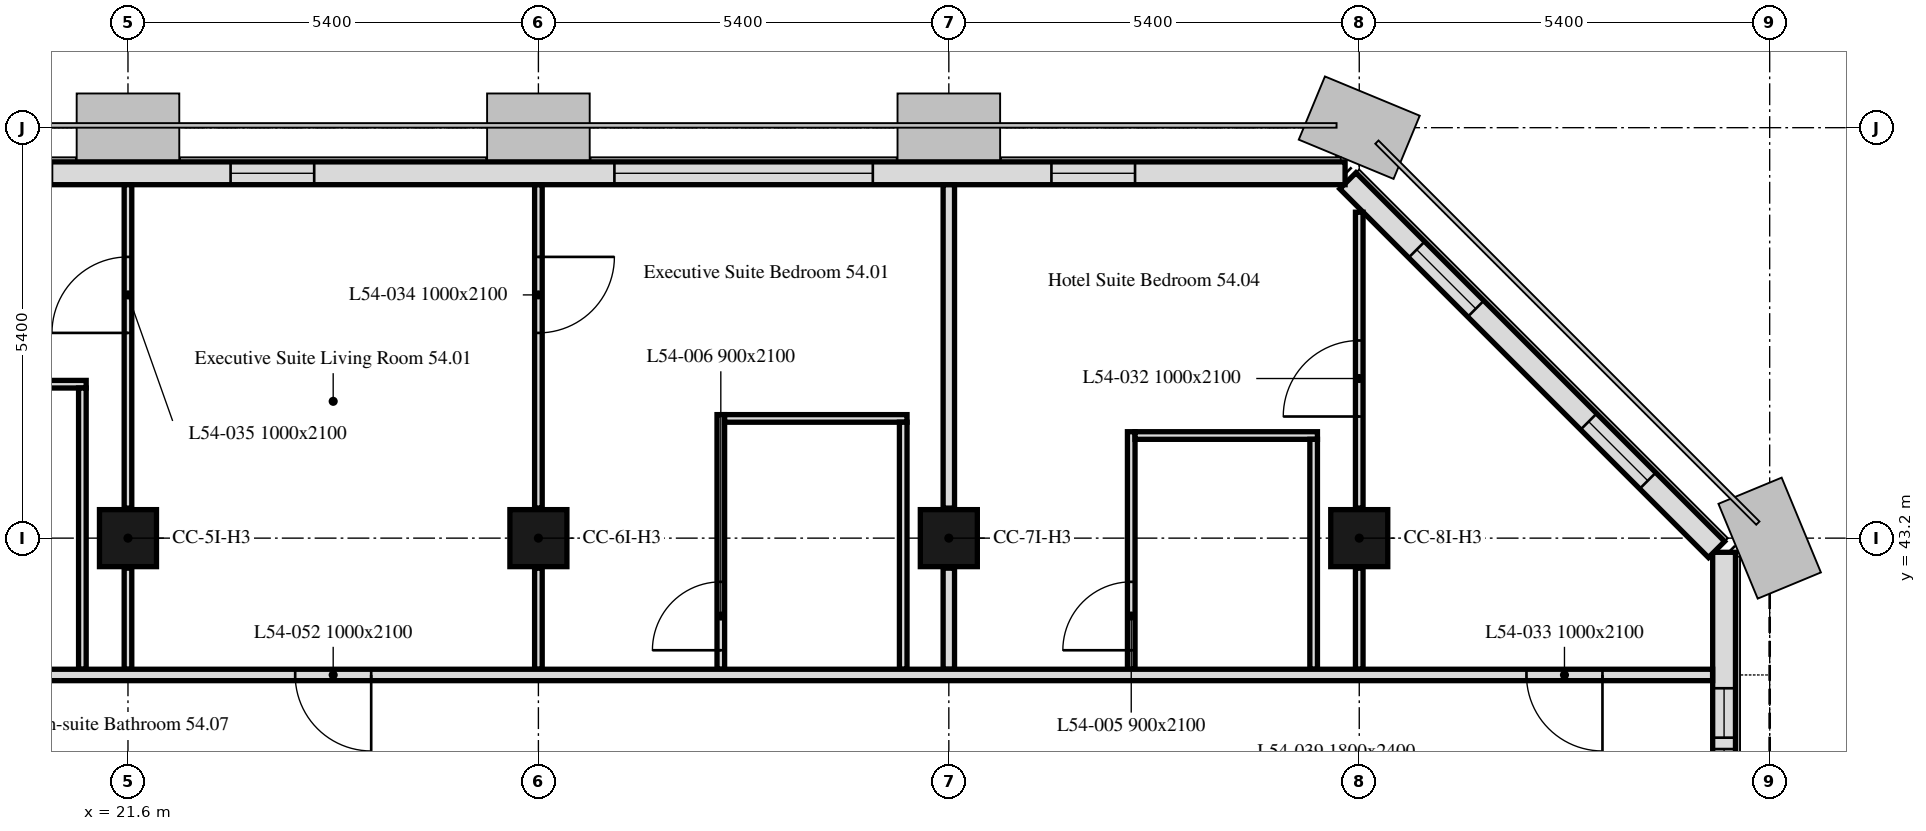
"""IFC4 building model, lengths in metres.
Left out: names, types, materials, properties, quantities, classifications, styles, units other than length and angle.
Written with IfcOpenShell. Run it as: python <this file> out.ifc"""

import sys

from ifc_helpers import new_model, si_unit, direction, frame, frame_2d, origin, origin_2d, place, context, subcontext, project, spatial, rectangle, extrude, element, fill, save


model = new_model("IFC4")
c1 = context("Model", 3, precision=1e-05, world=origin(), true_north=direction((0.0, 1.0)))
c2 = subcontext(c1, "Body", "Model", "MODEL_VIEW")
j1 = project(units=[si_unit("LENGTHUNIT", "METRE"), si_unit("PLANEANGLEUNIT", "RADIAN")], contexts=[c1])
p1 = place(None, origin())
s1 = spatial("IfcSite", under=j1, at=p1, CompositionType="ELEMENT")
p2 = place(p1, origin())
s2 = spatial("IfcBuilding", under=s1, at=p2, CompositionType="ELEMENT")
p3 = place(p2, frame((0.0, 0.0, 217.0)))
s3 = spatial("IfcBuildingStorey", under=s2, at=p3, CompositionType="ELEMENT", Elevation=217.0)
for number, where, z_axis, x_axis in (
    (1, (21.6, 43.2, 0.0), (0.0, 0.0, 1.0), (1.0, 0.0, 0.0)),
    (2, (27.0, 43.2, 0.0), (0.0, 0.0, 1.0), (1.0, 0.0, 0.0)),
    (3, (32.4, 43.2, 0.0), (0.0, 0.0, 1.0), (1.0, 0.0, 0.0)),
    (4, (37.8, 43.2, 0.0), (0.0, 0.0, 1.0), (1.0, 0.0, 0.0)),
):
    element("IfcColumn", number, at=place(p3, frame(where, z_axis=z_axis, x_axis=x_axis)), inside=s3, PredefinedType="COLUMN", context=c2, shape_type="SweptSolid", body=[
        extrude(rectangle(XDim=0.75, YDim=0.75, at=origin_2d()), origin(), (0.0, 0.0, 1.0), 3.0),
    ])
p4 = place(p3, frame((42.6, 32.4, 0.0), z_axis=(0.0, 0.0, 1.0), x_axis=(0.0, 1.0, 0.0)))
e5 = element("IfcWall", 5, at=p4, inside=s3, PredefinedType="SOLIDWALL", context=c2, shape_type="SweptSolid", body=[
    extrude(rectangle(XDim=10.614, YDim=0.3, at=frame_2d((5.307, 0.0))), origin(), (0.0, 0.0, 1.0), 3.0),
])
p5 = place(p4, frame((1.35, 0.0, 0.9)))
e6 = element("IfcOpeningElement", 6, at=p5, cuts=e5, PredefinedType="OPENING", context=c2, shape_type="SweptSolid", body=[
    extrude(rectangle(XDim=1.1, YDim=1.7, at=frame_2d((0.55, 0.85))), frame((0.0, 0.16, 0.0), z_axis=(0.0, -1.0, 0.0), x_axis=(1.0, 0.0, 0.0)), (0.0, 0.0, 1.0), 0.32),
])
p6 = place(p4, frame((2.95, 0.0, 0.9)))
e7 = element("IfcOpeningElement", 7, at=p6, cuts=e5, PredefinedType="OPENING", context=c2, shape_type="SweptSolid", body=[
    extrude(rectangle(XDim=1.1, YDim=1.7, at=frame_2d((0.55, 0.85))), frame((0.0, 0.16, 0.0), z_axis=(0.0, -1.0, 0.0), x_axis=(1.0, 0.0, 0.0)), (0.0, 0.0, 1.0), 0.32),
])
p7 = place(p4, frame((7.375, 0.0, 0.9)))
e8 = element("IfcOpeningElement", 8, at=p7, cuts=e5, PredefinedType="OPENING", context=c2, shape_type="SweptSolid", body=[
    extrude(rectangle(XDim=0.65, YDim=1.7, at=frame_2d((0.325, 0.85))), frame((0.0, 0.16, 0.0), z_axis=(0.0, -1.0, 0.0), x_axis=(1.0, 0.0, 0.0)), (0.0, 0.0, 1.0), 0.32),
])
p8 = place(p4, frame((8.175, 0.0, 0.9)))
e9 = element("IfcOpeningElement", 9, at=p8, cuts=e5, PredefinedType="OPENING", context=c2, shape_type="SweptSolid", body=[
    extrude(rectangle(XDim=0.65, YDim=1.7, at=frame_2d((0.325, 0.85))), frame((0.0, 0.16, 0.0), z_axis=(0.0, -1.0, 0.0), x_axis=(1.0, 0.0, 0.0)), (0.0, 0.0, 1.0), 0.32),
])
p9 = place(p3, frame((42.501, 43.051, 0.0), z_axis=(0.0, 0.0, 1.0), x_axis=(-0.707106781187, 0.707106781187, 0.0)))
e10 = element("IfcWall", 10, at=p9, inside=s3, PredefinedType="SOLIDWALL", context=c2, shape_type="SweptSolid", body=[
    extrude(rectangle(XDim=6.86, YDim=0.3, at=frame_2d((3.43, 0.0))), origin(), (0.0, 0.0, 1.0), 3.0),
])
p10 = place(p9, frame((1.28, 0.0, 0.9)))
e11 = element("IfcOpeningElement", 11, at=p10, cuts=e10, PredefinedType="OPENING", context=c2, shape_type="SweptSolid", body=[
    extrude(rectangle(XDim=1.1, YDim=1.7, at=frame_2d((0.55, 0.85))), frame((0.0, 0.16, 0.0), z_axis=(0.0, -1.0, 0.0), x_axis=(1.0, 0.0, 0.0)), (0.0, 0.0, 1.0), 0.32),
])
p11 = place(p9, frame((4.48, 0.0, 0.9)))
e12 = element("IfcOpeningElement", 12, at=p11, cuts=e10, PredefinedType="OPENING", context=c2, shape_type="SweptSolid", body=[
    extrude(rectangle(XDim=1.1, YDim=1.7, at=frame_2d((0.55, 0.85))), frame((0.0, 0.16, 0.0), z_axis=(0.0, -1.0, 0.0), x_axis=(1.0, 0.0, 0.0)), (0.0, 0.0, 1.0), 0.32),
])
p12 = place(p3, frame((37.614, 48.0, 0.0), z_axis=(0.0, 0.0, 1.0), x_axis=(-1.0, 0.0, 0.0)))
e13 = element("IfcWall", 13, at=p12, inside=s3, PredefinedType="SOLIDWALL", context=c2, shape_type="SweptSolid", body=[
    extrude(rectangle(XDim=32.027, YDim=0.3, at=frame_2d((16.014, 0.0))), origin(), (0.0, 0.0, 1.0), 3.0),
])
p13 = place(p12, frame((2.764, 0.0, 0.9)))
e14 = element("IfcOpeningElement", 14, at=p13, cuts=e13, PredefinedType="OPENING", context=c2, shape_type="SweptSolid", body=[
    extrude(rectangle(XDim=1.1, YDim=1.7, at=frame_2d((0.55, 0.85))), frame((0.0, 0.16, 0.0), z_axis=(0.0, -1.0, 0.0), x_axis=(1.0, 0.0, 0.0)), (0.0, 0.0, 1.0), 0.32),
])
p14 = place(p12, frame((6.214, 0.0, 0.9)))
e15 = element("IfcOpeningElement", 15, at=p14, cuts=e13, PredefinedType="OPENING", context=c2, shape_type="SweptSolid", body=[
    extrude(rectangle(XDim=3.4, YDim=1.7, at=frame_2d((1.7, 0.85))), frame((0.0, 0.16, 0.0), z_axis=(0.0, -1.0, 0.0), x_axis=(1.0, 0.0, 0.0)), (0.0, 0.0, 1.0), 0.32),
])
p15 = place(p12, frame((13.564, 0.0, 0.9)))
e16 = element("IfcOpeningElement", 16, at=p15, cuts=e13, PredefinedType="OPENING", context=c2, shape_type="SweptSolid", body=[
    extrude(rectangle(XDim=1.1, YDim=1.7, at=frame_2d((0.55, 0.85))), frame((0.0, 0.16, 0.0), z_axis=(0.0, -1.0, 0.0), x_axis=(1.0, 0.0, 0.0)), (0.0, 0.0, 1.0), 0.32),
])
p16 = place(p12, frame((17.014, 0.0, 0.9)))
e17 = element("IfcOpeningElement", 17, at=p16, cuts=e13, PredefinedType="OPENING", context=c2, shape_type="SweptSolid", body=[
    extrude(rectangle(XDim=3.4, YDim=1.7, at=frame_2d((1.7, 0.85))), frame((0.0, 0.16, 0.0), z_axis=(0.0, -1.0, 0.0), x_axis=(1.0, 0.0, 0.0)), (0.0, 0.0, 1.0), 0.32),
])
p17 = place(p12, frame((24.364, 0.0, 0.9)))
e18 = element("IfcOpeningElement", 18, at=p17, cuts=e13, PredefinedType="OPENING", context=c2, shape_type="SweptSolid", body=[
    extrude(rectangle(XDim=1.1, YDim=1.7, at=frame_2d((0.55, 0.85))), frame((0.0, 0.16, 0.0), z_axis=(0.0, -1.0, 0.0), x_axis=(1.0, 0.0, 0.0)), (0.0, 0.0, 1.0), 0.32),
])
p18 = place(p12, frame((27.814, 0.0, 0.9)))
e19 = element("IfcOpeningElement", 19, at=p18, cuts=e13, PredefinedType="OPENING", context=c2, shape_type="SweptSolid", body=[
    extrude(rectangle(XDim=3.4, YDim=1.7, at=frame_2d((1.7, 0.85))), frame((0.0, 0.16, 0.0), z_axis=(0.0, -1.0, 0.0), x_axis=(1.0, 0.0, 0.0)), (0.0, 0.0, 1.0), 0.32),
])
p19 = place(p3, frame((32.4, 47.849, 0.0), z_axis=(0.0, 0.0, 1.0), x_axis=(0.0, -1.0, 0.0)))
e20 = element("IfcWall", 20, at=p19, inside=s3, PredefinedType="PARTITIONING", context=c2, shape_type="SweptSolid", body=[
    extrude(rectangle(XDim=4.254, YDim=0.15, at=frame_2d((2.127, 0.0))), origin(), (0.0, 0.0, 1.0), 2.4),
])
p20 = place(p3, frame((32.4, 42.805, 0.0), z_axis=(0.0, 0.0, 1.0), x_axis=(0.0, -1.0, 0.0)))
e21 = element("IfcWall", 21, at=p20, inside=s3, PredefinedType="PARTITIONING", context=c2, shape_type="SweptSolid", body=[
    extrude(rectangle(XDim=1.33, YDim=0.15, at=frame_2d((0.665, 0.0))), origin(), (0.0, 0.0, 1.0), 2.4),
])
p21 = place(p3, frame((34.8, 41.475, 0.0), z_axis=(0.0, 0.0, 1.0), x_axis=(0.0, 1.0, 0.0)))
e22 = element("IfcWall", 22, at=p21, inside=s3, PredefinedType="PARTITIONING", context=c2, shape_type="SweptSolid", body=[
    extrude(rectangle(XDim=3.125, YDim=0.1, at=frame_2d((1.562, 0.0))), origin(), (0.0, 0.0, 1.0), 3.0),
])
p22 = place(p21, frame((0.25, 0.0, 0.0)))
e23 = element("IfcOpeningElement", 23, at=p22, cuts=e22, PredefinedType="OPENING", context=c2, shape_type="SweptSolid", body=[
    extrude(rectangle(XDim=0.9, YDim=2.1, at=frame_2d((0.45, 1.05))), frame((0.0, 0.05, 0.0), z_axis=(0.0, -1.0, 0.0), x_axis=(1.0, 0.0, 0.0)), (0.0, 0.0, 1.0), 0.1),
])
p23 = place(p3, frame((34.85, 44.55, 0.0), z_axis=(0.0, 0.0, 1.0), x_axis=(1.0, 0.0, 0.0)))
e24 = element("IfcWall", 24, at=p23, inside=s3, PredefinedType="PARTITIONING", context=c2, shape_type="SweptSolid", body=[
    extrude(rectangle(XDim=2.4, YDim=0.1, at=frame_2d((1.2, 0.0))), origin(), (0.0, 0.0, 1.0), 3.0),
])
p24 = place(p3, frame((37.2, 44.5, 0.0), z_axis=(0.0, 0.0, 1.0), x_axis=(0.0, -1.0, 0.0)))
e25 = element("IfcWall", 25, at=p24, inside=s3, PredefinedType="PARTITIONING", context=c2, shape_type="SweptSolid", body=[
    extrude(rectangle(XDim=3.025, YDim=0.1, at=frame_2d((1.512, 0.0))), origin(), (0.0, 0.0, 1.0), 3.0),
])
p25 = place(p3, frame((37.8, 41.475, 0.0), z_axis=(0.0, 0.0, 1.0), x_axis=(0.0, 1.0, 0.0)))
e26 = element("IfcWall", 26, at=p25, inside=s3, PredefinedType="PARTITIONING", context=c2, shape_type="SweptSolid", body=[
    extrude(rectangle(XDim=1.33, YDim=0.1, at=frame_2d((0.665, 0.0))), origin(), (0.0, 0.0, 1.0), 3.0),
])
p26 = place(p3, frame((37.8, 43.595, 0.0), z_axis=(0.0, 0.0, 1.0), x_axis=(0.0, 1.0, 0.0)))
e27 = element("IfcWall", 27, at=p26, inside=s3, PredefinedType="PARTITIONING", context=c2, shape_type="SweptSolid", body=[
    extrude(rectangle(XDim=3.893, YDim=0.1, at=frame_2d((1.946, 0.0))), origin(), (0.0, 0.0, 1.0), 3.0),
])
p27 = place(p26, frame((1.205, 0.0, 0.0)))
e28 = element("IfcOpeningElement", 28, at=p27, cuts=e27, PredefinedType="OPENING", context=c2, shape_type="SweptSolid", body=[
    extrude(rectangle(XDim=1.0, YDim=2.1, at=frame_2d((0.5, 1.05))), frame((0.0, 0.05, 0.0), z_axis=(0.0, -1.0, 0.0), x_axis=(1.0, 0.0, 0.0)), (0.0, 0.0, 1.0), 0.1),
])
p28 = place(p3, frame((27.0, 47.849, 0.0), z_axis=(0.0, 0.0, 1.0), x_axis=(0.0, -1.0, 0.0)))
e29 = element("IfcWall", 29, at=p28, inside=s3, PredefinedType="PARTITIONING", context=c2, shape_type="SweptSolid", body=[
    extrude(rectangle(XDim=4.254, YDim=0.1, at=frame_2d((2.127, 0.0))), origin(), (0.0, 0.0, 1.0), 2.4),
])
p29 = place(p28, frame((0.949, 0.0, 0.0)))
e30 = element("IfcOpeningElement", 30, at=p29, cuts=e29, PredefinedType="OPENING", context=c2, shape_type="SweptSolid", body=[
    extrude(rectangle(XDim=1.0, YDim=2.1, at=frame_2d((0.5, 1.05))), frame((0.0, 0.05, 0.0), z_axis=(0.0, -1.0, 0.0), x_axis=(1.0, 0.0, 0.0)), (0.0, 0.0, 1.0), 0.1),
])
p30 = place(p3, frame((27.0, 42.805, 0.0), z_axis=(0.0, 0.0, 1.0), x_axis=(0.0, -1.0, 0.0)))
e31 = element("IfcWall", 31, at=p30, inside=s3, PredefinedType="PARTITIONING", context=c2, shape_type="SweptSolid", body=[
    extrude(rectangle(XDim=1.33, YDim=0.1, at=frame_2d((0.665, 0.0))), origin(), (0.0, 0.0, 1.0), 2.4),
])
p31 = place(p3, frame((29.4, 41.475, 0.0), z_axis=(0.0, 0.0, 1.0), x_axis=(0.0, 1.0, 0.0)))
e32 = element("IfcWall", 32, at=p31, inside=s3, PredefinedType="PARTITIONING", context=c2, shape_type="SweptSolid", body=[
    extrude(rectangle(XDim=3.35, YDim=0.1, at=frame_2d((1.675, 0.0))), origin(), (0.0, 0.0, 1.0), 3.0),
])
p32 = place(p31, frame((0.25, 0.0, 0.0)))
e33 = element("IfcOpeningElement", 33, at=p32, cuts=e32, PredefinedType="OPENING", context=c2, shape_type="SweptSolid", body=[
    extrude(rectangle(XDim=0.9, YDim=2.1, at=frame_2d((0.45, 1.05))), frame((0.0, 0.05, 0.0), z_axis=(0.0, -1.0, 0.0), x_axis=(1.0, 0.0, 0.0)), (0.0, 0.0, 1.0), 0.1),
])
p33 = place(p3, frame((29.45, 44.775, 0.0), z_axis=(0.0, 0.0, 1.0), x_axis=(1.0, 0.0, 0.0)))
e34 = element("IfcWall", 34, at=p33, inside=s3, PredefinedType="PARTITIONING", context=c2, shape_type="SweptSolid", body=[
    extrude(rectangle(XDim=2.4, YDim=0.1, at=frame_2d((1.2, 0.0))), origin(), (0.0, 0.0, 1.0), 3.0),
])
p34 = place(p3, frame((31.8, 44.725, 0.0), z_axis=(0.0, 0.0, 1.0), x_axis=(0.0, -1.0, 0.0)))
e35 = element("IfcWall", 35, at=p34, inside=s3, PredefinedType="PARTITIONING", context=c2, shape_type="SweptSolid", body=[
    extrude(rectangle(XDim=3.25, YDim=0.1, at=frame_2d((1.625, 0.0))), origin(), (0.0, 0.0, 1.0), 3.0),
])
p35 = place(p3, frame((18.65, 45.225, 0.0), z_axis=(0.0, 0.0, 1.0), x_axis=(1.0, 0.0, 0.0)))
e36 = element("IfcWall", 36, at=p35, inside=s3, PredefinedType="PARTITIONING", context=c2, shape_type="SweptSolid", body=[
    extrude(rectangle(XDim=2.4, YDim=0.1, at=frame_2d((1.2, 0.0))), origin(), (0.0, 0.0, 1.0), 3.0),
])
p36 = place(p3, frame((21.0, 45.175, 0.0), z_axis=(0.0, 0.0, 1.0), x_axis=(0.0, -1.0, 0.0)))
e37 = element("IfcWall", 37, at=p36, inside=s3, PredefinedType="PARTITIONING", context=c2, shape_type="SweptSolid", body=[
    extrude(rectangle(XDim=3.7, YDim=0.1, at=frame_2d((1.85, 0.0))), origin(), (0.0, 0.0, 1.0), 3.0),
])
p37 = place(p3, frame((21.6, 41.475, 0.0), z_axis=(0.0, 0.0, 1.0), x_axis=(0.0, 1.0, 0.0)))
e38 = element("IfcWall", 38, at=p37, inside=s3, PredefinedType="PARTITIONING", context=c2, shape_type="SweptSolid", body=[
    extrude(rectangle(XDim=1.33, YDim=0.1, at=frame_2d((0.665, 0.0))), origin(), (0.0, 0.0, 1.0), 2.4),
])
p38 = place(p3, frame((21.6, 43.595, 0.0), z_axis=(0.0, 0.0, 1.0), x_axis=(0.0, 1.0, 0.0)))
e39 = element("IfcWall", 39, at=p38, inside=s3, PredefinedType="PARTITIONING", context=c2, shape_type="SweptSolid", body=[
    extrude(rectangle(XDim=4.254, YDim=0.1, at=frame_2d((2.127, 0.0))), origin(), (0.0, 0.0, 1.0), 2.4),
])
p39 = place(p38, frame((2.305, 0.0, 0.0)))
e40 = element("IfcOpeningElement", 40, at=p39, cuts=e39, PredefinedType="OPENING", context=c2, shape_type="SweptSolid", body=[
    extrude(rectangle(XDim=1.0, YDim=2.1, at=frame_2d((0.5, 1.05))), frame((0.0, 0.05, 0.0), z_axis=(0.0, -1.0, 0.0), x_axis=(1.0, 0.0, 0.0)), (0.0, 0.0, 1.0), 0.1),
])
p40 = place(p3, frame((42.449, 41.4, 0.0), z_axis=(0.0, 0.0, 1.0), x_axis=(-1.0, 0.0, 0.0)))
e41 = element("IfcWall", 41, at=p40, inside=s3, PredefinedType="PARTITIONING", context=c2, shape_type="SweptSolid", body=[
    extrude(rectangle(XDim=41.698, YDim=0.15, at=frame_2d((20.849, 0.0))), origin(), (0.0, 0.0, 1.0), 2.4),
])
p41 = place(p40, frame((1.449, 0.0, 0.0)))
e42 = element("IfcOpeningElement", 42, at=p41, cuts=e41, PredefinedType="OPENING", context=c2, shape_type="SweptSolid", body=[
    extrude(rectangle(XDim=1.0, YDim=2.1, at=frame_2d((0.5, 1.05))), frame((0.0, 0.075, 0.0), z_axis=(0.0, -1.0, 0.0), x_axis=(1.0, 0.0, 0.0)), (0.0, 0.0, 1.0), 0.15),
])
p42 = place(p40, frame((29.249, 0.0, 0.0)))
e43 = element("IfcOpeningElement", 43, at=p42, cuts=e41, PredefinedType="OPENING", context=c2, shape_type="SweptSolid", body=[
    extrude(rectangle(XDim=1.0, YDim=2.1, at=frame_2d((0.5, 1.05))), frame((0.0, 0.075, 0.0), z_axis=(0.0, -1.0, 0.0), x_axis=(1.0, 0.0, 0.0)), (0.0, 0.0, 1.0), 0.15),
])
p43 = place(p40, frame((37.599, 0.0, 0.0)))
e44 = element("IfcOpeningElement", 44, at=p43, cuts=e41, PredefinedType="OPENING", context=c2, shape_type="SweptSolid", body=[
    extrude(rectangle(XDim=1.0, YDim=2.1, at=frame_2d((0.5, 1.05))), frame((0.0, 0.075, 0.0), z_axis=(0.0, -1.0, 0.0), x_axis=(1.0, 0.0, 0.0)), (0.0, 0.0, 1.0), 0.15),
])
p44 = place(p40, frame((17.649, 0.0, 0.0)))
e45 = element("IfcOpeningElement", 45, at=p44, cuts=e41, PredefinedType="OPENING", context=c2, shape_type="SweptSolid", body=[
    extrude(rectangle(XDim=1.0, YDim=2.1, at=frame_2d((0.5, 1.05))), frame((0.0, 0.075, 0.0), z_axis=(0.0, -1.0, 0.0), x_axis=(1.0, 0.0, 0.0)), (0.0, 0.0, 1.0), 0.15),
])
p45 = place(p7, origin())
e46 = element("IfcWindow", 46, at=p45, inside=s3, PartitioningType="SINGLE_PANEL", PredefinedType="WINDOW", context=c2, shape_type="SweptSolid", body=[
    extrude(rectangle(XDim=0.65, YDim=1.7, at=frame_2d((0.325, 0.85))), frame((0.0, 0.03, 0.0), z_axis=(0.0, -1.0, 0.0), x_axis=(1.0, 0.0, 0.0)), (0.0, 0.0, 1.0), 0.06),
])
fill(e8, e46)
p46 = place(p8, origin())
e47 = element("IfcWindow", 47, at=p46, inside=s3, PartitioningType="SINGLE_PANEL", PredefinedType="WINDOW", context=c2, shape_type="SweptSolid", body=[
    extrude(rectangle(XDim=0.65, YDim=1.7, at=frame_2d((0.325, 0.85))), frame((0.0, 0.03, 0.0), z_axis=(0.0, -1.0, 0.0), x_axis=(1.0, 0.0, 0.0)), (0.0, 0.0, 1.0), 0.06),
])
fill(e9, e47)
p47 = place(p10, origin())
e48 = element("IfcWindow", 48, at=p47, inside=s3, PartitioningType="SINGLE_PANEL", PredefinedType="WINDOW", context=c2, shape_type="SweptSolid", body=[
    extrude(rectangle(XDim=1.1, YDim=1.7, at=frame_2d((0.55, 0.85))), frame((0.0, 0.03, 0.0), z_axis=(0.0, -1.0, 0.0), x_axis=(1.0, 0.0, 0.0)), (0.0, 0.0, 1.0), 0.06),
])
fill(e11, e48)
p48 = place(p11, origin())
e49 = element("IfcWindow", 49, at=p48, inside=s3, PartitioningType="SINGLE_PANEL", PredefinedType="WINDOW", context=c2, shape_type="SweptSolid", body=[
    extrude(rectangle(XDim=1.1, YDim=1.7, at=frame_2d((0.55, 0.85))), frame((0.0, 0.03, 0.0), z_axis=(0.0, -1.0, 0.0), x_axis=(1.0, 0.0, 0.0)), (0.0, 0.0, 1.0), 0.06),
])
fill(e12, e49)
p49 = place(p13, origin())
e50 = element("IfcWindow", 50, at=p49, inside=s3, PartitioningType="SINGLE_PANEL", PredefinedType="WINDOW", context=c2, shape_type="SweptSolid", body=[
    extrude(rectangle(XDim=1.1, YDim=1.7, at=frame_2d((0.55, 0.85))), frame((0.0, 0.03, 0.0), z_axis=(0.0, -1.0, 0.0), x_axis=(1.0, 0.0, 0.0)), (0.0, 0.0, 1.0), 0.06),
])
fill(e14, e50)
p50 = place(p14, origin())
e51 = element("IfcWindow", 51, at=p50, inside=s3, PartitioningType="SINGLE_PANEL", PredefinedType="WINDOW", context=c2, shape_type="SweptSolid", body=[
    extrude(rectangle(XDim=3.4, YDim=1.7, at=frame_2d((1.7, 0.85))), frame((0.0, 0.03, 0.0), z_axis=(0.0, -1.0, 0.0), x_axis=(1.0, 0.0, 0.0)), (0.0, 0.0, 1.0), 0.06),
])
fill(e15, e51)
p51 = place(p15, origin())
e52 = element("IfcWindow", 52, at=p51, inside=s3, PartitioningType="SINGLE_PANEL", PredefinedType="WINDOW", context=c2, shape_type="SweptSolid", body=[
    extrude(rectangle(XDim=1.1, YDim=1.7, at=frame_2d((0.55, 0.85))), frame((0.0, 0.03, 0.0), z_axis=(0.0, -1.0, 0.0), x_axis=(1.0, 0.0, 0.0)), (0.0, 0.0, 1.0), 0.06),
])
fill(e16, e52)
p52 = place(p22, origin())
e53 = element("IfcDoor", 53, at=p52, inside=s3, OperationType="SINGLE_SWING_RIGHT", PredefinedType="DOOR", context=c2, shape_type="SweptSolid", body=[
    extrude(rectangle(XDim=0.9, YDim=2.1, at=frame_2d((0.45, 1.05))), frame((0.0, 0.025, 0.0), z_axis=(0.0, -1.0, 0.0), x_axis=(1.0, 0.0, 0.0)), (0.0, 0.0, 1.0), 0.05),
])
fill(e23, e53)
p53 = place(p32, origin())
e54 = element("IfcDoor", 54, at=p53, inside=s3, OperationType="SINGLE_SWING_RIGHT", PredefinedType="DOOR", context=c2, shape_type="SweptSolid", body=[
    extrude(rectangle(XDim=0.9, YDim=2.1, at=frame_2d((0.45, 1.05))), frame((0.0, 0.025, 0.0), z_axis=(0.0, -1.0, 0.0), x_axis=(1.0, 0.0, 0.0)), (0.0, 0.0, 1.0), 0.05),
])
fill(e33, e54)
p54 = place(p27, origin())
e55 = element("IfcDoor", 55, at=p54, inside=s3, OperationType="SINGLE_SWING_RIGHT", PredefinedType="DOOR", context=c2, shape_type="SweptSolid", body=[
    extrude(rectangle(XDim=1.0, YDim=2.1, at=frame_2d((0.5, 1.05))), frame((0.0, 0.025, 0.0), z_axis=(0.0, -1.0, 0.0), x_axis=(1.0, 0.0, 0.0)), (0.0, 0.0, 1.0), 0.05),
])
fill(e28, e55)
p55 = place(p41, origin())
e56 = element("IfcDoor", 56, at=p55, inside=s3, OperationType="SINGLE_SWING_LEFT", PredefinedType="DOOR", context=c2, shape_type="SweptSolid", body=[
    extrude(rectangle(XDim=1.0, YDim=2.1, at=frame_2d((0.5, 1.05))), frame((0.0, 0.025, 0.0), z_axis=(0.0, -1.0, 0.0), x_axis=(1.0, 0.0, 0.0)), (0.0, 0.0, 1.0), 0.05),
])
fill(e42, e56)
p56 = place(p29, origin())
e57 = element("IfcDoor", 57, at=p56, inside=s3, OperationType="SINGLE_SWING_RIGHT", PredefinedType="DOOR", context=c2, shape_type="SweptSolid", body=[
    extrude(rectangle(XDim=1.0, YDim=2.1, at=frame_2d((0.5, 1.05))), frame((0.0, 0.025, 0.0), z_axis=(0.0, -1.0, 0.0), x_axis=(1.0, 0.0, 0.0)), (0.0, 0.0, 1.0), 0.05),
])
fill(e30, e57)
p57 = place(p39, origin())
e58 = element("IfcDoor", 58, at=p57, inside=s3, OperationType="SINGLE_SWING_RIGHT", PredefinedType="DOOR", context=c2, shape_type="SweptSolid", body=[
    extrude(rectangle(XDim=1.0, YDim=2.1, at=frame_2d((0.5, 1.05))), frame((0.0, 0.025, 0.0), z_axis=(0.0, -1.0, 0.0), x_axis=(1.0, 0.0, 0.0)), (0.0, 0.0, 1.0), 0.05),
])
fill(e40, e58)
p58 = place(p44, origin())
e59 = element("IfcDoor", 59, at=p58, inside=s3, OperationType="SINGLE_SWING_RIGHT", PredefinedType="DOOR", context=c2, shape_type="SweptSolid", body=[
    extrude(rectangle(XDim=1.0, YDim=2.1, at=frame_2d((0.5, 1.05))), frame((0.0, 0.025, 0.0), z_axis=(0.0, -1.0, 0.0), x_axis=(1.0, 0.0, 0.0)), (0.0, 0.0, 1.0), 0.05),
])
fill(e45, e59)
save(model, sys.argv[1])
